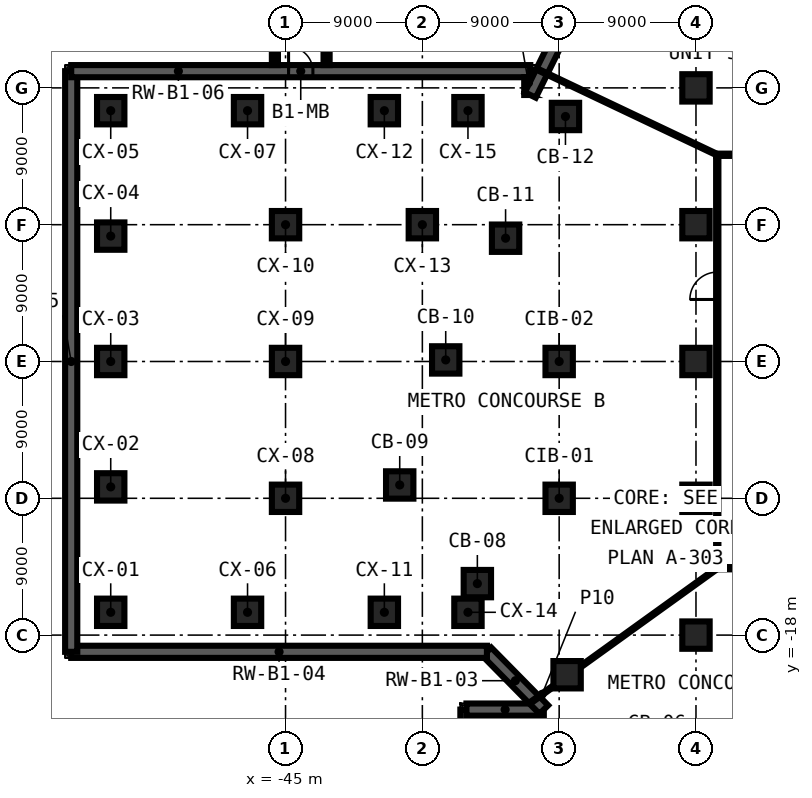
"""IFC4 building model, lengths in metres.
Left out: names, types, materials, properties, quantities, classifications, styles, units other than length and angle.
Written with IfcOpenShell. Run it as: python <this file> out.ifc"""

import sys

from ifc_helpers import new_model, si_unit, direction, frame, frame_2d, origin, origin_2d, place, context, subcontext, project, spatial, polyline, rectangle, outline, extrude, element, fill, save


model = new_model("IFC4")
c1 = context("Model", 3, precision=1e-05, world=origin(), true_north=direction((0.0, 1.0)))
c2 = subcontext(c1, "Body", "Model", "MODEL_VIEW")
j1 = project(units=[si_unit("LENGTHUNIT", "METRE"), si_unit("PLANEANGLEUNIT", "RADIAN")], contexts=[c1])
p1 = place(None, origin())
s1 = spatial("IfcSite", under=j1, at=p1, CompositionType="ELEMENT")
p2 = place(p1, origin())
s2 = spatial("IfcBuilding", under=s1, at=p2, CompositionType="ELEMENT")
p3 = place(p2, frame((0.0, 0.0, -6.0)))
s3 = spatial("IfcBuildingStorey", under=s2, at=p3, CompositionType="ELEMENT", Elevation=-6.0)
for number, where, z_axis, x_axis in (
    (1, (-26.478, -20.608, 0.0), (0.0, 0.0, 1.0), (1.0, 0.0, 0.0)),
    (2, (-32.382, -14.613, 0.0), (0.0, 0.0, 1.0), (1.0, 0.0, 0.0)),
    (3, (-37.489, -8.123, 0.0), (0.0, 0.0, 1.0), (1.0, 0.0, 0.0)),
    (4, (-34.463, 0.103, 0.0), (0.0, 0.0, 1.0), (1.0, 0.0, 0.0)),
    (5, (-30.525, 8.111, 0.0), (0.0, 0.0, 1.0), (1.0, 0.0, 0.0)),
    (6, (-26.586, 16.118, 0.0), (0.0, 0.0, 1.0), (1.0, 0.0, 0.0)),
    (7, (-27.0, -9.0, 0.0), (0.0, 0.0, 1.0), (1.0, 0.0, 0.0)),
    (8, (-27.0, 0.0, 0.0), (0.0, 0.0, 1.0), (1.0, 0.0, 0.0)),
    (9, (-18.0, -18.0, 0.0), (0.0, 0.0, 1.0), (1.0, 0.0, 0.0)),
    (10, (-18.0, -9.0, 0.0), (0.0, 0.0, 1.0), (1.0, 0.0, 0.0)),
    (11, (-18.0, 0.0, 0.0), (0.0, 0.0, 1.0), (1.0, 0.0, 0.0)),
    (12, (-18.0, 9.0, 0.0), (0.0, 0.0, 1.0), (1.0, 0.0, 0.0)),
    (13, (-18.0, 18.0, 0.0), (0.0, 0.0, 1.0), (1.0, 0.0, 0.0)),
    (14, (-56.5, -16.5, 0.0), (0.0, 0.0, 1.0), (1.0, 0.0, 0.0)),
    (15, (-56.5, -8.25, 0.0), (0.0, 0.0, 1.0), (1.0, 0.0, 0.0)),
    (16, (-56.5, 0.0, 0.0), (0.0, 0.0, 1.0), (1.0, 0.0, 0.0)),
    (17, (-56.5, 8.25, 0.0), (0.0, 0.0, 1.0), (1.0, 0.0, 0.0)),
    (18, (-56.5, 16.5, 0.0), (0.0, 0.0, 1.0), (1.0, 0.0, 0.0)),
    (19, (-47.5, -16.5, 0.0), (0.0, 0.0, 1.0), (1.0, 0.0, 0.0)),
    (20, (-47.5, 16.5, 0.0), (0.0, 0.0, 1.0), (1.0, 0.0, 0.0)),
    (21, (-45.0, -9.0, 0.0), (0.0, 0.0, 1.0), (1.0, 0.0, 0.0)),
    (22, (-45.0, 0.0, 0.0), (0.0, 0.0, 1.0), (1.0, 0.0, 0.0)),
    (23, (-45.0, 9.0, 0.0), (0.0, 0.0, 1.0), (1.0, 0.0, 0.0)),
    (24, (-38.5, -16.5, 0.0), (0.0, 0.0, 1.0), (1.0, 0.0, 0.0)),
    (25, (-38.5, 16.5, 0.0), (0.0, 0.0, 1.0), (1.0, 0.0, 0.0)),
    (26, (-36.0, 9.0, 0.0), (0.0, 0.0, 1.0), (1.0, 0.0, 0.0)),
    (27, (-33.0, -16.5, 0.0), (0.0, 0.0, 1.0), (1.0, 0.0, 0.0)),
    (28, (-33.0, 16.5, 0.0), (0.0, 0.0, 1.0), (1.0, 0.0, 0.0)),
):
    element("IfcColumn", number, at=place(p3, frame(where, z_axis=z_axis, x_axis=x_axis)), inside=s3, PredefinedType="COLUMN", context=c2, shape_type="SweptSolid", body=[
        extrude(rectangle(XDim=1.8, YDim=1.8, at=origin_2d()), origin(), (0.0, 0.0, 1.0), 5.55),
    ])
p4 = place(p3, frame((-33.1, -47.1, 0.0), z_axis=(0.0, 0.0, 1.0), x_axis=(0.0, 1.0, 0.0)))
e29 = element("IfcWall", 29, at=p4, inside=s3, PredefinedType="SHEAR", context=c2, shape_type="SweptSolid", body=[
    extrude(rectangle(XDim=24.2, YDim=0.8, at=frame_2d((12.1, 0.0))), origin(), (0.0, 0.0, 1.0), 5.55),
])
p5 = place(p3, frame((-33.1, -22.9, 0.0), z_axis=(0.0, 0.0, 1.0), x_axis=(1.0, 0.0, 0.0)))
e30 = element("IfcWall", 30, at=p5, inside=s3, PredefinedType="SHEAR", context=c2, shape_type="SweptSolid", body=[
    extrude(rectangle(XDim=5.091, YDim=0.8, at=frame_2d((2.545, 0.0))), origin(), (0.0, 0.0, 1.0), 5.55),
])
p6 = place(p3, frame((-28.01, -22.9, 0.0), z_axis=(0.0, 0.0, 1.0), x_axis=(-0.701730823209, 0.712442174326, 0.0)))
e31 = element("IfcWall", 31, at=p6, inside=s3, PredefinedType="SHEAR", context=c2, shape_type="SweptSolid", body=[
    extrude(rectangle(XDim=5.333, YDim=0.8, at=frame_2d((2.667, 0.0))), origin(), (0.0, 0.0, 1.0), 5.55),
])
p7 = place(p3, frame((-31.752, -19.1, 0.0), z_axis=(0.0, 0.0, 1.0), x_axis=(-1.0, 0.0, 0.0)))
e32 = element("IfcWall", 32, at=p7, inside=s3, PredefinedType="SHEAR", context=c2, shape_type="SweptSolid", body=[
    extrude(rectangle(XDim=27.348, YDim=0.8, at=frame_2d((13.674, 0.0))), origin(), (0.0, 0.0, 1.0), 5.55),
])
p8 = place(p3, frame((-59.1, -19.1, 0.0), z_axis=(0.0, 0.0, 1.0), x_axis=(0.0, 1.0, 0.0)))
e33 = element("IfcWall", 33, at=p8, inside=s3, PredefinedType="SHEAR", context=c2, shape_type="SweptSolid", body=[
    extrude(rectangle(XDim=38.2, YDim=0.8, at=frame_2d((19.1, 0.0))), origin(), (0.0, 0.0, 1.0), 5.55),
])
p9 = place(p3, frame((-59.1, 19.1, 0.0), z_axis=(0.0, 0.0, 1.0), x_axis=(1.0, 0.0, 0.0)))
e34 = element("IfcWall", 34, at=p9, inside=s3, PredefinedType="SHEAR", context=c2, shape_type="SweptSolid", body=[
    extrude(rectangle(XDim=30.2, YDim=0.8, at=frame_2d((15.1, 0.0))), origin(), (0.0, 0.0, 1.0), 5.55),
])
p10 = place(p9, frame((14.3, 0.0, 0.0)))
e35 = element("IfcOpeningElement", 35, at=p10, cuts=e34, PredefinedType="OPENING", context=c2, shape_type="SweptSolid", body=[
    extrude(rectangle(XDim=1.6, YDim=2.4, at=frame_2d((0.8, 1.2))), frame((0.0, 0.41, 0.0), z_axis=(0.0, -1.0, 0.0), x_axis=(1.0, 0.0, 0.0)), (0.0, 0.0, 1.0), 0.82),
])
p11 = place(p3, origin())
e36 = element("IfcWall", 36, at=p11, inside=s3, PredefinedType="SHEAR", context=c2, shape_type="SweptSolid", body=[
    extrude(outline(polyline([(-29.3, 17.532), (-28.9, 17.532), (-29.259, 17.708), (-28.574, 19.1), (-28.9, 19.1), (-28.9, 18.7), (-29.3, 18.7), (-29.3, 17.532)])), origin(), (0.0, 0.0, 1.0), 5.55),
])
p12 = place(p3, frame((-28.9, 17.532, 0.0), z_axis=(0.0, 0.0, 1.0), x_axis=(0.44134064225, 0.897339644448, 0.0)))
e37 = element("IfcWall", 37, at=p12, inside=s3, PredefinedType="SHEAR", context=c2, shape_type="SweptSolid", body=[
    extrude(rectangle(XDim=15.356, YDim=0.8, at=frame_2d((7.678, 0.0))), origin(), (0.0, 0.0, 1.0), 5.55),
])
p13 = place(p3, frame((16.675, -13.6, 0.0), z_axis=(0.0, 0.0, 1.0), x_axis=(-1.0, 0.0, 0.0)))
e38 = element("IfcWall", 38, at=p13, inside=s3, PredefinedType="PARTITIONING", context=c2, shape_type="SweptSolid", body=[
    extrude(rectangle(XDim=33.35, YDim=0.15, at=frame_2d((16.675, 0.0))), origin(), (0.0, 0.0, 1.0), 5.55),
])
p14 = place(p13, frame((27.775, 0.0, 0.0)))
e39 = element("IfcOpeningElement", 39, at=p14, cuts=e38, PredefinedType="OPENING", context=c2, shape_type="SweptSolid", body=[
    extrude(rectangle(XDim=1.8, YDim=2.4, at=frame_2d((0.9, 1.2))), frame((0.0, 0.085, 0.0), z_axis=(0.0, -1.0, 0.0), x_axis=(1.0, 0.0, 0.0)), (0.0, 0.0, 1.0), 0.17),
])
p15 = place(p13, frame((15.175, 0.0, 0.0)))
e40 = element("IfcOpeningElement", 40, at=p15, cuts=e38, PredefinedType="OPENING", context=c2, shape_type="SweptSolid", body=[
    extrude(rectangle(XDim=1.2, YDim=2.1, at=frame_2d((0.6, 1.05))), frame((0.0, 0.085, 0.0), z_axis=(0.0, -1.0, 0.0), x_axis=(1.0, 0.0, 0.0)), (0.0, 0.0, 1.0), 0.17),
])
p16 = place(p13, frame((3.025, 0.0, 0.0)))
e41 = element("IfcOpeningElement", 41, at=p16, cuts=e38, PredefinedType="OPENING", context=c2, shape_type="SweptSolid", body=[
    extrude(rectangle(XDim=1.2, YDim=2.1, at=frame_2d((0.6, 1.05))), frame((0.0, 0.085, 0.0), z_axis=(0.0, -1.0, 0.0), x_axis=(1.0, 0.0, 0.0)), (0.0, 0.0, 1.0), 0.17),
])
p17 = place(p3, frame((-16.675, 13.6, 0.0), z_axis=(0.0, 0.0, 1.0), x_axis=(1.0, 0.0, 0.0)))
e42 = element("IfcWall", 42, at=p17, inside=s3, PredefinedType="PARTITIONING", context=c2, shape_type="SweptSolid", body=[
    extrude(rectangle(XDim=33.35, YDim=0.15, at=frame_2d((16.675, 0.0))), origin(), (0.0, 0.0, 1.0), 5.55),
])
p18 = place(p17, frame((27.642, 0.0, 0.0)))
e43 = element("IfcOpeningElement", 43, at=p18, cuts=e42, PredefinedType="OPENING", context=c2, shape_type="SweptSolid", body=[
    extrude(rectangle(XDim=1.2, YDim=2.1, at=frame_2d((0.6, 1.05))), frame((0.0, 0.085, 0.0), z_axis=(0.0, -1.0, 0.0), x_axis=(1.0, 0.0, 0.0)), (0.0, 0.0, 1.0), 0.17),
])
p19 = place(p17, frame((19.317, 0.0, 0.0)))
e44 = element("IfcOpeningElement", 44, at=p19, cuts=e42, PredefinedType="OPENING", context=c2, shape_type="SweptSolid", body=[
    extrude(rectangle(XDim=1.2, YDim=2.1, at=frame_2d((0.6, 1.05))), frame((0.0, 0.085, 0.0), z_axis=(0.0, -1.0, 0.0), x_axis=(1.0, 0.0, 0.0)), (0.0, 0.0, 1.0), 0.17),
])
p20 = place(p17, frame((9.587, 0.0, 0.0)))
e45 = element("IfcOpeningElement", 45, at=p20, cuts=e42, PredefinedType="OPENING", context=c2, shape_type="SweptSolid", body=[
    extrude(rectangle(XDim=1.2, YDim=2.1, at=frame_2d((0.6, 1.05))), frame((0.0, 0.085, 0.0), z_axis=(0.0, -1.0, 0.0), x_axis=(1.0, 0.0, 0.0)), (0.0, 0.0, 1.0), 0.17),
])
p21 = place(p17, frame((2.099, 0.0, 0.0)))
e46 = element("IfcOpeningElement", 46, at=p21, cuts=e42, PredefinedType="OPENING", context=c2, shape_type="SweptSolid", body=[
    extrude(rectangle(XDim=1.2, YDim=2.1, at=frame_2d((0.6, 1.05))), frame((0.0, 0.085, 0.0), z_axis=(0.0, -1.0, 0.0), x_axis=(1.0, 0.0, 0.0)), (0.0, 0.0, 1.0), 0.17),
])
p22 = place(p3, frame((-28.865, -22.43, 0.0), z_axis=(0.0, 0.0, 1.0), x_axis=(0.811531815169, 0.584308234555, 0.0)))
e47 = element("IfcWall", 47, at=p22, inside=s3, PredefinedType="PARTITIONING", context=c2, shape_type="SweptSolid", body=[
    extrude(rectangle(XDim=1.833, YDim=0.1, at=frame_2d((0.917, 0.0))), origin(), (0.0, 0.0, 1.0), 5.55),
])
p23 = place(p3, frame((-25.578, -20.063, 0.0), z_axis=(0.0, 0.0, 1.0), x_axis=(0.811568664577, 0.584257051885, 0.0)))
e48 = element("IfcWall", 48, at=p23, inside=s3, PredefinedType="PARTITIONING", context=c2, shape_type="SweptSolid", body=[
    extrude(rectangle(XDim=11.062, YDim=0.1, at=frame_2d((5.531, 0.0))), origin(), (0.0, 0.0, 1.0), 5.55),
])
p24 = place(p3, frame((-16.6, -13.525, 0.0), z_axis=(0.0, 0.0, 1.0), x_axis=(0.0, 1.0, 0.0)))
e49 = element("IfcWall", 49, at=p24, inside=s3, PredefinedType="PARTITIONING", context=c2, shape_type="SweptSolid", body=[
    extrude(rectangle(XDim=27.05, YDim=0.15, at=frame_2d((13.525, 0.0))), origin(), (0.0, 0.0, 1.0), 5.55),
])
p25 = place(p24, frame((17.605, 0.0, 0.0)))
e50 = element("IfcOpeningElement", 50, at=p25, cuts=e49, PredefinedType="OPENING", context=c2, shape_type="SweptSolid", body=[
    extrude(rectangle(XDim=1.8, YDim=2.4, at=frame_2d((0.9, 1.2))), frame((0.0, 0.085, 0.0), z_axis=(0.0, -1.0, 0.0), x_axis=(1.0, 0.0, 0.0)), (0.0, 0.0, 1.0), 0.17),
])
p26 = place(p3, frame((-28.392, 19.2, 0.0), z_axis=(0.0, 0.0, 1.0), x_axis=(0.903331859358, -0.428942364273, 0.0)))
e51 = element("IfcWall", 51, at=p26, inside=s3, PredefinedType="PARTITIONING", context=c2, shape_type="SweptSolid", body=[
    extrude(rectangle(XDim=13.054, YDim=0.1, at=frame_2d((6.527, 0.0))), origin(), (0.0, 0.0, 1.0), 5.55),
])
p27 = place(p2, origin())
s4 = spatial("IfcBuildingStorey", under=s2, at=p27, CompositionType="ELEMENT", Elevation=0.0)
for number, where, z_axis, x_axis in (
    (52, (-45.7, 19.5, -17.0), (0.0, 0.0, 1.0), (0.0, 1.0, 0.0)),
    (53, (-42.3, 19.5, -17.0), (0.0, 0.0, 1.0), (0.0, 1.0, 0.0)),
):
    element("IfcWall", number, at=place(p27, frame(where, z_axis=z_axis, x_axis=x_axis)), inside=s4, PredefinedType="SHEAR", context=c2, shape_type="SweptSolid", body=[
        extrude(rectangle(XDim=8.6, YDim=0.4, at=frame_2d((4.3, 0.0))), origin(), (0.0, 0.0, 1.0), 16.7),
    ])
p28 = place(p25, origin())
e54 = element("IfcDoor", 54, at=p28, inside=s3, OperationType="DOUBLE_DOOR_SINGLE_SWING", PredefinedType="DOOR", context=c2, shape_type="SweptSolid", body=[
    extrude(rectangle(XDim=1.8, YDim=2.4, at=frame_2d((0.9, 1.2))), frame((0.0, 0.025, 0.0), z_axis=(0.0, -1.0, 0.0), x_axis=(1.0, 0.0, 0.0)), (0.0, 0.0, 1.0), 0.05),
])
fill(e50, e54)
p29 = place(p10, origin())
e55 = element("IfcDoor", 55, at=p29, inside=s3, OperationType="SINGLE_SWING_LEFT", PredefinedType="DOOR", context=c2, shape_type="SweptSolid", body=[
    extrude(rectangle(XDim=1.6, YDim=2.4, at=frame_2d((0.8, 1.2))), frame((0.0, 0.025, 0.0), z_axis=(0.0, -1.0, 0.0), x_axis=(1.0, 0.0, 0.0)), (0.0, 0.0, 1.0), 0.05),
])
fill(e35, e55)
save(model, sys.argv[1])
